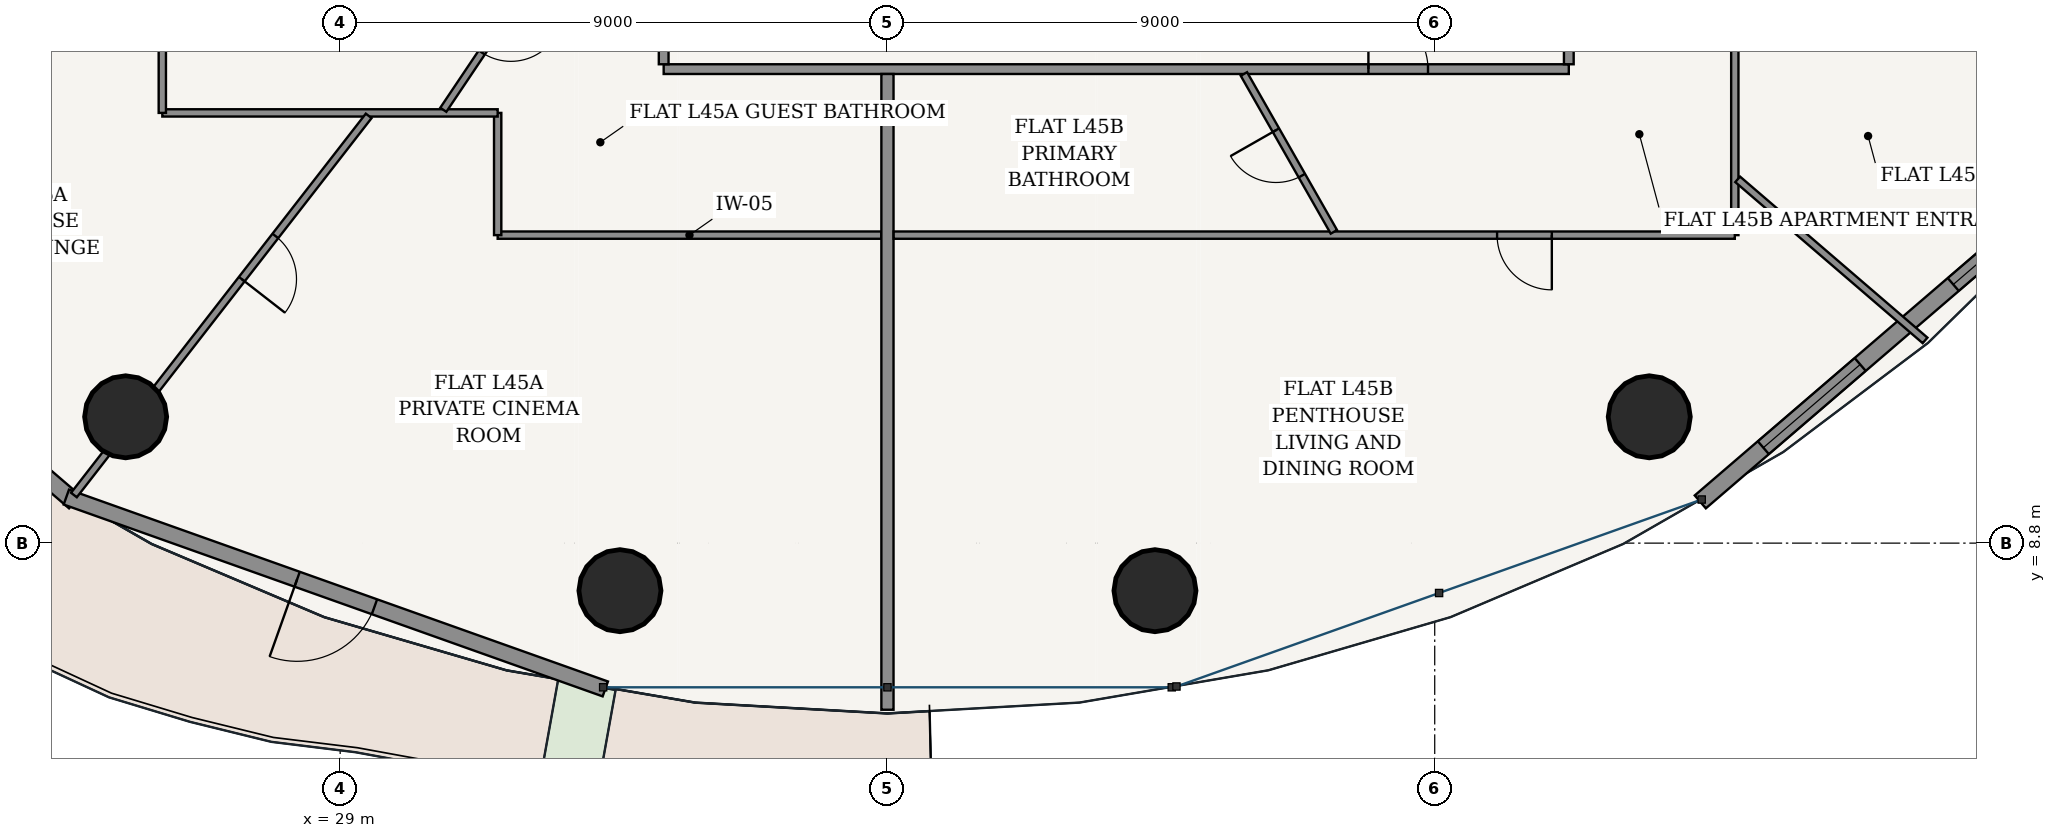
"""IFC4 building model, lengths in metres.
Left out: names, types, materials, properties, quantities, classifications, styles, units other than length and angle.
Written with IfcOpenShell. Run it as: python <this file> out.ifc"""

import sys

from ifc_helpers import new_model, si_unit, direction, frame, frame_2d, origin, origin_2d, place, context, subcontext, project, spatial, rectangle, hollow_circle, extrude, source, transform, mapped, element, fill, save


model = new_model("IFC4")
c1 = context("Model", 3, precision=1e-05, world=origin(), true_north=direction((-0.2419218956, 0.970295726276)))
c2 = subcontext(c1, "Body", "Model", "MODEL_VIEW")
j1 = project(units=[si_unit("LENGTHUNIT", "METRE"), si_unit("PLANEANGLEUNIT", "RADIAN")], contexts=[c1])
p1 = place(None, origin())
s1 = spatial("IfcSite", under=j1, at=p1, CompositionType="ELEMENT")
p2 = place(p1, origin())
s2 = spatial("IfcBuilding", under=s1, at=p2, CompositionType="ELEMENT")
p3 = place(p2, frame((0.0, 0.0, 171.4)))
s3 = spatial("IfcBuildingStorey", under=s2, at=p3, CompositionType="ELEMENT", Elevation=171.4)
for number, where, z_axis, x_axis in (
    (1, (25.472, 10.877, 0.0), (0.0, 0.0, 1.0), (1.0, 0.0, 0.0)),
    (2, (33.601, 8.018, 0.0), (0.0, 0.0, 1.0), (1.0, 0.0, 0.0)),
    (3, (42.399, 8.018, 0.0), (0.0, 0.0, 1.0), (1.0, 0.0, 0.0)),
    (4, (50.528, 10.877, 0.0), (0.0, 0.0, 1.0), (1.0, 0.0, 0.0)),
):
    element("IfcColumn", number, at=place(p3, frame(where, z_axis=z_axis, x_axis=x_axis)), inside=s3, PredefinedType="COLUMN", context=c2, shape_type="SweptSolid", body=[
        extrude(hollow_circle(Radius=0.675, WallThickness=0.042, at=origin_2d()), origin(), (0.0, 0.0, 1.0), 3.6),
    ])
p4 = place(p3, frame((17.843, 15.313, 0.0), z_axis=(0.0, 0.0, 1.0), x_axis=(0.75843401647, -0.651749831348, 0.0)))
e5 = element("IfcWall", 5, at=p4, inside=s3, PredefinedType="SOLIDWALL", context=c2, shape_type="SweptSolid", body=[
    extrude(rectangle(XDim=8.952, YDim=0.28, at=frame_2d((4.476, 0.0))), origin(), (0.0, 0.0, 1.0), 3.33),
])
p5 = place(p4, frame((1.367, 0.0, 0.85)))
e6 = element("IfcOpeningElement", 6, at=p5, cuts=e5, PredefinedType="OPENING", context=c2, shape_type="SweptSolid", body=[
    extrude(rectangle(XDim=2.1, YDim=1.95, at=frame_2d((1.05, 0.975))), frame((0.0, 0.15, 0.0), z_axis=(0.0, -1.0, 0.0), x_axis=(1.0, 0.0, 0.0)), (0.0, 0.0, 1.0), 0.3),
])
p6 = place(p4, frame((5.485, 0.0, 0.85)))
e7 = element("IfcOpeningElement", 7, at=p6, cuts=e5, PredefinedType="OPENING", context=c2, shape_type="SweptSolid", body=[
    extrude(rectangle(XDim=2.1, YDim=1.95, at=frame_2d((1.05, 0.975))), frame((0.0, 0.15, 0.0), z_axis=(0.0, -1.0, 0.0), x_axis=(1.0, 0.0, 0.0)), (0.0, 0.0, 1.0), 0.3),
])
p7 = place(p3, frame((24.497, 9.557, 0.0), z_axis=(0.0, 0.0, 1.0), x_axis=(0.942103604331, -0.335321932934, 0.0)))
e8 = element("IfcWall", 8, at=p7, inside=s3, PredefinedType="SOLIDWALL", context=c2, shape_type="SweptSolid", body=[
    extrude(rectangle(XDim=9.408, YDim=0.26, at=frame_2d((4.704, 0.0))), origin(), (0.0, 0.0, 1.0), 3.33),
])
p8 = place(p7, frame((4.029, 0.0, 0.0)))
e9 = element("IfcOpeningElement", 9, at=p8, cuts=e8, PredefinedType="OPENING", context=c2, shape_type="SweptSolid", body=[
    extrude(rectangle(XDim=1.35, YDim=2.2, at=frame_2d((0.675, 1.1))), frame((0.0, 0.14, 0.0), z_axis=(0.0, -1.0, 0.0), x_axis=(1.0, 0.0, 0.0)), (0.0, 0.0, 1.0), 0.28),
])
p9 = place(p3, frame((51.367, 9.478, 0.0), z_axis=(0.0, 0.0, 1.0), x_axis=(0.75843401647, 0.651749831348, 0.0)))
e10 = element("IfcWall", 10, at=p9, inside=s3, PredefinedType="SOLIDWALL", context=c2, shape_type="SweptSolid", body=[
    extrude(rectangle(XDim=8.952, YDim=0.28, at=frame_2d((4.476, 0.0))), origin(), (0.0, 0.0, 1.0), 3.33),
])
p10 = place(p9, frame((1.367, 0.0, 0.85)))
e11 = element("IfcOpeningElement", 11, at=p10, cuts=e10, PredefinedType="OPENING", context=c2, shape_type="SweptSolid", body=[
    extrude(rectangle(XDim=2.1, YDim=1.95, at=frame_2d((1.05, 0.975))), frame((0.0, 0.15, 0.0), z_axis=(0.0, -1.0, 0.0), x_axis=(1.0, 0.0, 0.0)), (0.0, 0.0, 1.0), 0.3),
])
p11 = place(p9, frame((5.485, 0.0, 0.85)))
e12 = element("IfcOpeningElement", 12, at=p11, cuts=e10, PredefinedType="OPENING", context=c2, shape_type="SweptSolid", body=[
    extrude(rectangle(XDim=2.1, YDim=1.95, at=frame_2d((1.05, 0.975))), frame((0.0, 0.15, 0.0), z_axis=(0.0, -1.0, 0.0), x_axis=(1.0, 0.0, 0.0)), (0.0, 0.0, 1.0), 0.3),
])
p12 = place(p3, frame((34.32, 16.595, 0.0), z_axis=(0.0, 0.0, 1.0), x_axis=(1.0, 0.0, 0.0)))
e13 = element("IfcWall", 13, at=p12, inside=s3, PredefinedType="PARTITIONING", context=c2, shape_type="SweptSolid", body=[
    extrude(rectangle(XDim=14.885, YDim=0.16, at=frame_2d((7.442, 0.0))), origin(), (0.0, 0.0, 1.0), 2.776),
])
p13 = place(p12, frame((11.59, 0.0, 0.0)))
e14 = element("IfcOpeningElement", 14, at=p13, cuts=e13, PredefinedType="OPENING", context=c2, shape_type="SweptSolid", body=[
    extrude(rectangle(XDim=0.98, YDim=2.2, at=frame_2d((0.49, 1.1))), frame((0.0, 0.09, 0.0), z_axis=(0.0, -1.0, 0.0), x_axis=(1.0, 0.0, 0.0)), (0.0, 0.0, 1.0), 0.18),
])
p14 = place(p3, frame((34.32, 16.675, 0.0), z_axis=(0.0, 0.0, 1.0), x_axis=(0.0, 1.0, 0.0)))
e15 = element("IfcWall", 15, at=p14, inside=s3, PredefinedType="PARTITIONING", context=c2, shape_type="SweptSolid", body=[
    extrude(rectangle(XDim=1.85, YDim=0.16, at=frame_2d((0.925, 0.0))), origin(), (0.0, 0.0, 1.0), 3.33),
])
p15 = place(p3, frame((49.205, 16.675, 0.0), z_axis=(0.0, 0.0, 1.0), x_axis=(0.0, 1.0, 0.0)))
e16 = element("IfcWall", 16, at=p15, inside=s3, PredefinedType="PARTITIONING", context=c2, shape_type="SweptSolid", body=[
    extrude(rectangle(XDim=18.4, YDim=0.16, at=frame_2d((9.2, 0.0))), origin(), (0.0, 0.0, 1.0), 2.776),
])
p16 = place(p3, frame((37.898, 13.865, 0.0), z_axis=(0.0, 0.0, 1.0), x_axis=(-1.0, 0.0, 0.0)))
e17 = element("IfcWall", 17, at=p16, inside=s3, PredefinedType="PARTITIONING", context=c2, shape_type="SweptSolid", body=[
    extrude(rectangle(XDim=6.308, YDim=0.12, at=frame_2d((3.154, 0.0))), origin(), (0.0, 0.0, 1.0), 2.776),
])
p17 = place(p3, frame((31.59, 13.865, 0.0), z_axis=(0.0, 0.0, 1.0), x_axis=(0.0, 1.0, 0.0)))
e18 = element("IfcWall", 18, at=p17, inside=s3, PredefinedType="PARTITIONING", context=c2, shape_type="SweptSolid", body=[
    extrude(rectangle(XDim=2.01, YDim=0.12, at=frame_2d((1.005, 0.0))), origin(), (0.0, 0.0, 1.0), 3.005),
])
p18 = place(p3, frame((31.59, 15.875, 0.0), z_axis=(0.0, 0.0, 1.0), x_axis=(-1.0, 0.0, 0.0)))
e19 = element("IfcWall", 19, at=p18, inside=s3, PredefinedType="PARTITIONING", context=c2, shape_type="SweptSolid", body=[
    extrude(rectangle(XDim=5.515, YDim=0.12, at=frame_2d((2.758, 0.0))), origin(), (0.0, 0.0, 1.0), 2.776),
])
p19 = place(p3, frame((26.075, 15.875, 0.0), z_axis=(0.0, 0.0, 1.0), x_axis=(0.0, 1.0, 0.0)))
e20 = element("IfcWall", 20, at=p19, inside=s3, PredefinedType="PARTITIONING", context=c2, shape_type="SweptSolid", body=[
    extrude(rectangle(XDim=5.715, YDim=0.12, at=frame_2d((2.857, 0.0))), origin(), (0.0, 0.0, 1.0), 2.776),
])
p20 = place(p3, frame((26.021, 19.921, 0.0), z_axis=(0.0, 0.0, 1.0), x_axis=(-0.867161148693, -0.498027652041, 0.0)))
e21 = element("IfcWall", 21, at=p20, inside=s3, PredefinedType="PARTITIONING", context=c2, shape_type="SweptSolid", body=[
    extrude(rectangle(XDim=9.279, YDim=0.12, at=frame_2d((4.64, 0.0))), origin(), (0.0, 0.0, 1.0), 2.776),
])
p21 = place(p20, frame((3.192, 0.0, 0.0)))
e22 = element("IfcOpeningElement", 22, at=p21, cuts=e21, PredefinedType="OPENING", context=c2, shape_type="SweptSolid", body=[
    extrude(rectangle(XDim=0.9, YDim=2.15, at=frame_2d((0.45, 1.075))), frame((0.0, 0.07, 0.0), z_axis=(0.0, -1.0, 0.0), x_axis=(1.0, 0.0, 0.0)), (0.0, 0.0, 1.0), 0.14),
])
p22 = place(p3, frame((29.469, 15.826, 0.0), z_axis=(0.0, 0.0, 1.0), x_axis=(-0.61373942367, -0.789508657225, 0.0)))
e23 = element("IfcWall", 23, at=p22, inside=s3, PredefinedType="PARTITIONING", context=c2, shape_type="SweptSolid", body=[
    extrude(rectangle(XDim=7.898, YDim=0.12, at=frame_2d((3.949, 0.0))), origin(), (0.0, 0.0, 1.0), 2.776),
])
p23 = place(p22, frame((2.5, 0.0, 0.0)))
e24 = element("IfcOpeningElement", 24, at=p23, cuts=e23, PredefinedType="OPENING", context=c2, shape_type="SweptSolid", body=[
    extrude(rectangle(XDim=0.9, YDim=2.15, at=frame_2d((0.45, 1.075))), frame((0.0, 0.07, 0.0), z_axis=(0.0, -1.0, 0.0), x_axis=(1.0, 0.0, 0.0)), (0.0, 0.0, 1.0), 0.14),
])
p24 = place(p3, frame((32.441, 18.525, 0.0), z_axis=(0.0, 0.0, 1.0), x_axis=(-0.557594690071, -0.830113342625, 0.0)))
e25 = element("IfcWall", 25, at=p24, inside=s3, PredefinedType="PARTITIONING", context=c2, shape_type="SweptSolid", body=[
    extrude(rectangle(XDim=3.13, YDim=0.12, at=frame_2d((1.565, 0.0))), origin(), (0.0, 0.0, 1.0), 3.33),
])
p25 = place(p24, frame((1.135, 0.0, 0.0)))
e26 = element("IfcOpeningElement", 26, at=p25, cuts=e25, PredefinedType="OPENING", context=c2, shape_type="SweptSolid", body=[
    extrude(rectangle(XDim=0.86, YDim=2.15, at=frame_2d((0.43, 1.075))), frame((0.0, 0.07, 0.0), z_axis=(0.0, -1.0, 0.0), x_axis=(1.0, 0.0, 0.0)), (0.0, 0.0, 1.0), 0.14),
])
p26 = place(p3, frame((38.0, 16.515, 0.0), z_axis=(0.0, 0.0, 1.0), x_axis=(0.0, -1.0, 0.0)))
e27 = element("IfcWall", 27, at=p26, inside=s3, PredefinedType="PARTITIONING", context=c2, shape_type="SweptSolid", body=[
    extrude(rectangle(XDim=10.455, YDim=0.2, at=frame_2d((5.228, 0.0))), origin(), (0.0, 0.0, 1.0), 2.846),
])
p27 = place(p3, frame((51.935, 37.885, 0.0), z_axis=(0.0, 0.0, 1.0), x_axis=(0.0, -1.0, 0.0)))
e28 = element("IfcWall", 28, at=p27, inside=s3, PredefinedType="PARTITIONING", context=c2, shape_type="SweptSolid", body=[
    extrude(rectangle(XDim=24.02, YDim=0.12, at=frame_2d((12.01, 0.0))), origin(), (0.0, 0.0, 1.0), 2.776),
])
p28 = place(p27, frame((19.821, 0.0, 0.0)))
e29 = element("IfcOpeningElement", 29, at=p28, cuts=e28, PredefinedType="OPENING", context=c2, shape_type="SweptSolid", body=[
    extrude(rectangle(XDim=0.9, YDim=2.15, at=frame_2d((0.45, 1.075))), frame((0.0, 0.07, 0.0), z_axis=(0.0, -1.0, 0.0), x_axis=(1.0, 0.0, 0.0)), (0.0, 0.0, 1.0), 0.14),
])
p29 = place(p3, frame((51.935, 13.865, 0.0), z_axis=(0.0, 0.0, 1.0), x_axis=(-1.0, 0.0, 0.0)))
e30 = element("IfcWall", 30, at=p29, inside=s3, PredefinedType="PARTITIONING", context=c2, shape_type="SweptSolid", body=[
    extrude(rectangle(XDim=13.833, YDim=0.12, at=frame_2d((6.917, 0.0))), origin(), (0.0, 0.0, 1.0), 2.776),
])
p30 = place(p29, frame((3.009, 0.0, 0.0)))
e31 = element("IfcOpeningElement", 31, at=p30, cuts=e30, PredefinedType="OPENING", context=c2, shape_type="SweptSolid", body=[
    extrude(rectangle(XDim=0.9, YDim=2.15, at=frame_2d((0.45, 1.075))), frame((0.0, 0.07, 0.0), z_axis=(0.0, -1.0, 0.0), x_axis=(1.0, 0.0, 0.0)), (0.0, 0.0, 1.0), 0.14),
])
p31 = place(p3, frame((51.982, 14.782, 0.0), z_axis=(0.0, 0.0, 1.0), x_axis=(0.758356837469, -0.651839632935, 0.0)))
e32 = element("IfcWall", 32, at=p31, inside=s3, PredefinedType="PARTITIONING", context=c2, shape_type="SweptSolid", body=[
    extrude(rectangle(XDim=4.064, YDim=0.12, at=frame_2d((2.032, 0.0))), origin(), (0.0, 0.0, 1.0), 2.846),
])
p32 = place(p3, frame((43.862, 16.515, 0.0), z_axis=(0.0, 0.0, 1.0), x_axis=(0.495214761056, -0.868770591372, 0.0)))
e33 = element("IfcWall", 33, at=p32, inside=s3, PredefinedType="PARTITIONING", context=c2, shape_type="SweptSolid", body=[
    extrude(rectangle(XDim=2.988, YDim=0.12, at=frame_2d((1.494, 0.0))), origin(), (0.0, 0.0, 1.0), 3.005),
])
p33 = place(p32, frame((1.064, 0.0, 0.0)))
e34 = element("IfcOpeningElement", 34, at=p33, cuts=e33, PredefinedType="OPENING", context=c2, shape_type="SweptSolid", body=[
    extrude(rectangle(XDim=0.86, YDim=2.15, at=frame_2d((0.43, 1.075))), frame((0.0, 0.07, 0.0), z_axis=(0.0, -1.0, 0.0), x_axis=(1.0, 0.0, 0.0)), (0.0, 0.0, 1.0), 0.14),
])
m1 = source(origin(), c2, "Body", "SweptSolid", [
    extrude(rectangle(XDim=1.35, YDim=2.2, at=frame_2d((0.675, 1.1))), frame((0.0, 0.025, 0.0), z_axis=(0.0, -1.0, 0.0), x_axis=(1.0, 0.0, 0.0)), (0.0, 0.0, 1.0), 0.05),
])
p34 = place(p8, frame((1.35, 0.0, 0.0), z_axis=(0.0, 0.0, 1.0), x_axis=(-1.0, 0.0, 0.0)))
e35 = element("IfcDoor", 35, at=p34, inside=s3, OperationType="SINGLE_SWING_RIGHT", PredefinedType="DOOR", context=c2, shape_type="MappedRepresentation", body=[
    mapped(m1, transform((0.0, 0.0, 0.0), scale=1.0)),
])
fill(e9, e35)
m2 = source(origin(), c2, "Body", "SweptSolid", [
    extrude(rectangle(XDim=2.1, YDim=1.95, at=frame_2d((1.05, 0.975))), frame((0.0, 0.03, 0.0), z_axis=(0.0, -1.0, 0.0), x_axis=(1.0, 0.0, 0.0)), (0.0, 0.0, 1.0), 0.06),
])
p35 = place(p10, origin())
e36 = element("IfcWindow", 36, at=p35, inside=s3, PartitioningType="SINGLE_PANEL", PredefinedType="WINDOW", context=c2, shape_type="MappedRepresentation", body=[
    mapped(m2, transform((0.0, 0.0, 0.0), scale=1.0)),
])
fill(e11, e36)
p36 = place(p11, origin())
e37 = element("IfcWindow", 37, at=p36, inside=s3, PartitioningType="SINGLE_PANEL", PredefinedType="WINDOW", context=c2, shape_type="MappedRepresentation", body=[
    mapped(m2, transform((0.0, 0.0, 0.0), scale=1.0)),
])
fill(e12, e37)
m3 = source(origin(), c2, "Body", "SweptSolid", [
    extrude(rectangle(XDim=0.86, YDim=2.15, at=frame_2d((0.43, 1.075))), frame((0.0, 0.025, 0.0), z_axis=(0.0, -1.0, 0.0), x_axis=(1.0, 0.0, 0.0)), (0.0, 0.0, 1.0), 0.05),
])
p37 = place(p25, origin())
e38 = element("IfcDoor", 38, at=p37, inside=s3, OperationType="SINGLE_SWING_LEFT", PredefinedType="DOOR", context=c2, shape_type="MappedRepresentation", body=[
    mapped(m3, transform((0.0, 0.0, 0.0), scale=1.0)),
])
fill(e26, e38)
m4 = source(origin(), c2, "Body", "SweptSolid", [
    extrude(rectangle(XDim=0.9, YDim=2.15, at=frame_2d((0.45, 1.075))), frame((0.0, 0.025, 0.0), z_axis=(0.0, -1.0, 0.0), x_axis=(1.0, 0.0, 0.0)), (0.0, 0.0, 1.0), 0.05),
])
p38 = place(p23, origin())
e39 = element("IfcDoor", 39, at=p38, inside=s3, OperationType="SINGLE_SWING_RIGHT", PredefinedType="DOOR", context=c2, shape_type="MappedRepresentation", body=[
    mapped(m4, transform((0.0, 0.0, 0.0), scale=1.0)),
])
fill(e24, e39)
m5 = source(origin(), c2, "Body", "SweptSolid", [
    extrude(rectangle(XDim=0.98, YDim=2.2, at=frame_2d((0.49, 1.1))), frame((0.0, 0.025, 0.0), z_axis=(0.0, -1.0, 0.0), x_axis=(1.0, 0.0, 0.0)), (0.0, 0.0, 1.0), 0.05),
])
p39 = place(p13, origin())
e40 = element("IfcDoor", 40, at=p39, inside=s3, OperationType="SINGLE_SWING_LEFT", PredefinedType="DOOR", context=c2, shape_type="MappedRepresentation", body=[
    mapped(m5, transform((0.0, 0.0, 0.0), scale=1.0)),
])
fill(e14, e40)
p40 = place(p33, frame((0.86, 0.0, 0.0), z_axis=(0.0, 0.0, 1.0), x_axis=(-1.0, 0.0, 0.0)))
e41 = element("IfcDoor", 41, at=p40, inside=s3, OperationType="SINGLE_SWING_RIGHT", PredefinedType="DOOR", context=c2, shape_type="MappedRepresentation", body=[
    mapped(m3, transform((0.0, 0.0, 0.0), scale=1.0)),
])
fill(e34, e41)
p41 = place(p30, origin())
e42 = element("IfcDoor", 42, at=p41, inside=s3, OperationType="SINGLE_SWING_LEFT", PredefinedType="DOOR", context=c2, shape_type="MappedRepresentation", body=[
    mapped(m4, transform((0.0, 0.0, 0.0), scale=1.0)),
])
fill(e31, e42)
save(model, sys.argv[1])
